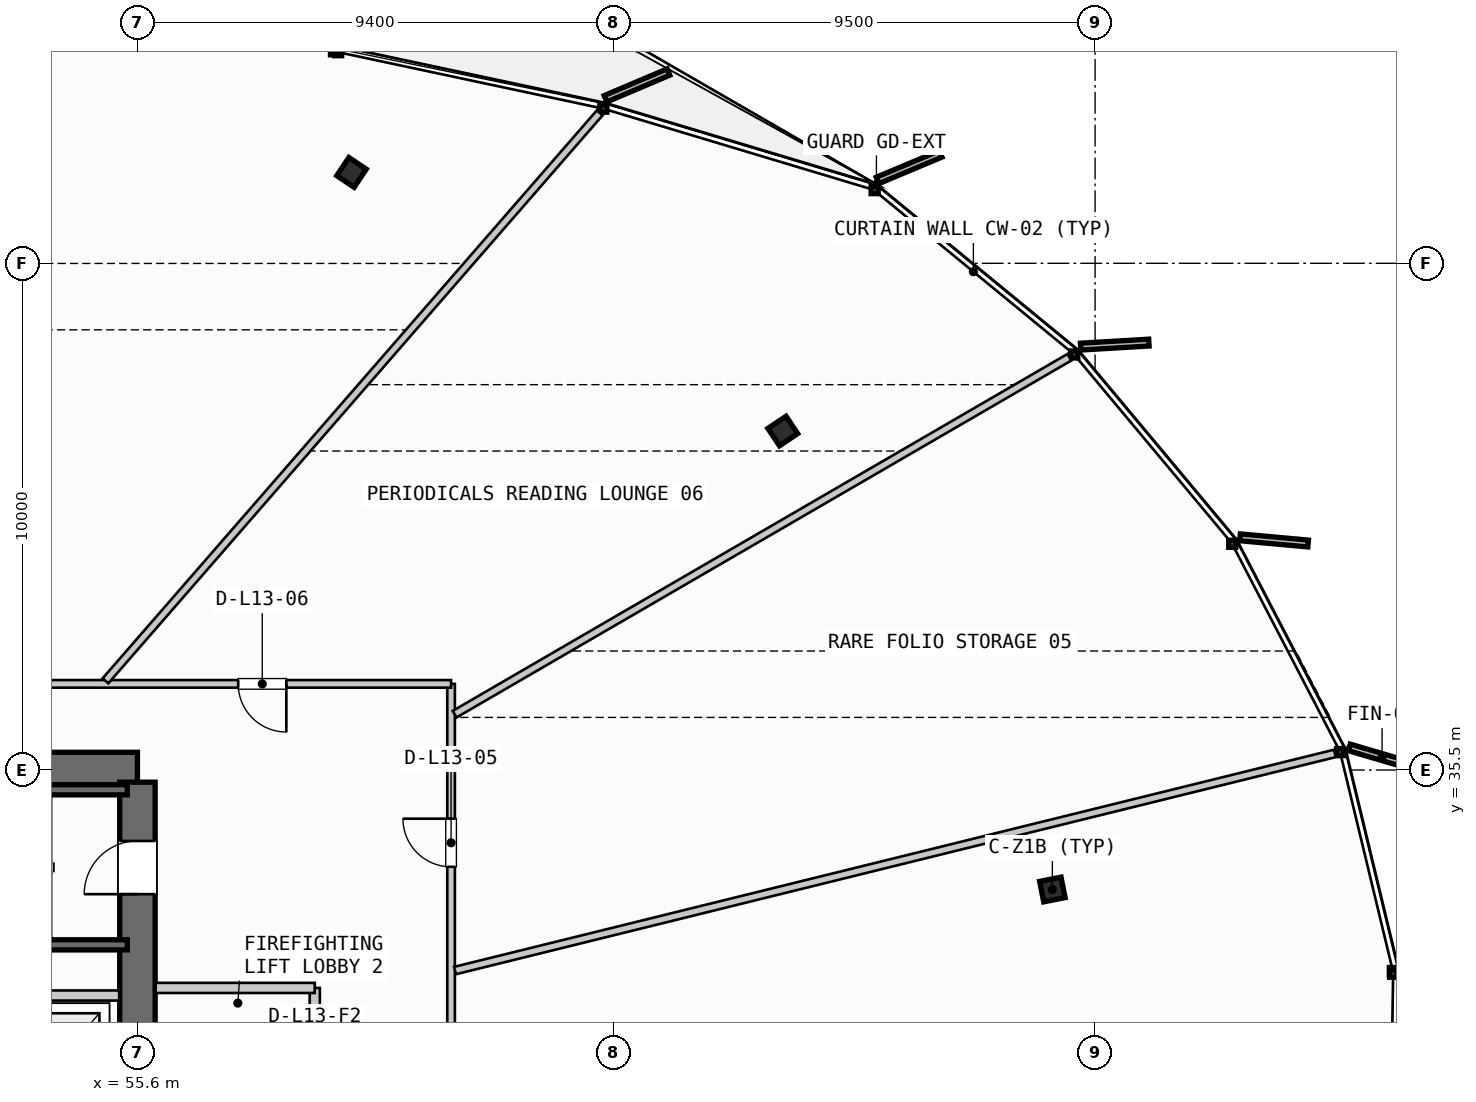
"""IFC4 building model, lengths in metres.
Left out: names, types, materials, properties, quantities, classifications, styles, units other than length and angle.
Written with IfcOpenShell. Run it as: python <this file> out.ifc"""

import sys

from ifc_helpers import new_model, si_unit, direction, frame, frame_2d, origin, origin_2d, place, context, subcontext, project, spatial, rectangle, i_section, extrude, source, transform, mapped, element, fill, save


model = new_model("IFC4")
c1 = context("Model", 3, precision=1e-05, world=origin(), true_north=direction((0.0, 1.0)))
c2 = subcontext(c1, "Body", "Model", "MODEL_VIEW")
j1 = project(units=[si_unit("LENGTHUNIT", "METRE"), si_unit("PLANEANGLEUNIT", "RADIAN")], contexts=[c1])
p1 = place(None, origin())
s1 = spatial("IfcSite", under=j1, at=p1, CompositionType="ELEMENT")
p2 = place(p1, origin())
s2 = spatial("IfcBuilding", under=s1, at=p2, CompositionType="ELEMENT")
p3 = place(p2, frame((0.0, 0.0, 56.2)))
s3 = spatial("IfcBuildingStorey", under=s2, at=p3, CompositionType="ELEMENT", Elevation=56.2)
p4 = place(p3, frame((55.6, 35.5, 0.0), z_axis=(0.0, 0.0, 1.0), x_axis=(-1.0, 0.0, 0.0)))
e1 = element("IfcWall", 1, at=p4, inside=s3, PredefinedType="SHEAR", context=c2, shape_type="SweptSolid", body=[
    extrude(rectangle(XDim=17.6, YDim=0.7, at=frame_2d((8.8, 0.0))), origin(), (0.0, 0.0, 1.0), 3.55),
])
p5 = place(p4, frame((8.05, 0.0, 0.0)))
e2 = element("IfcOpeningElement", 2, at=p5, cuts=e1, PredefinedType="OPENING", context=c2, shape_type="SweptSolid", body=[
    extrude(rectangle(XDim=1.5, YDim=2.2, at=frame_2d((0.75, 1.1))), frame((0.0, 0.36, 0.0), z_axis=(0.0, -1.0, 0.0), x_axis=(1.0, 0.0, 0.0)), (0.0, 0.0, 1.0), 0.72),
])
p6 = place(p4, frame((14.95, 0.0, 0.0)))
e3 = element("IfcOpeningElement", 3, at=p6, cuts=e1, PredefinedType="OPENING", context=c2, shape_type="SweptSolid", body=[
    extrude(rectangle(XDim=1.4, YDim=2.3, at=frame_2d((0.7, 1.15))), frame((0.0, 0.36, 0.0), z_axis=(0.0, -1.0, 0.0), x_axis=(1.0, 0.0, 0.0)), (0.0, 0.0, 1.0), 0.72),
])
p7 = place(p4, frame((12.3, 0.0, 0.0)))
e4 = element("IfcOpeningElement", 4, at=p7, cuts=e1, PredefinedType="OPENING", context=c2, shape_type="SweptSolid", body=[
    extrude(rectangle(XDim=0.95, YDim=2.15, at=frame_2d((0.475, 1.075))), frame((0.0, 0.36, 0.0), z_axis=(0.0, -1.0, 0.0), x_axis=(1.0, 0.0, 0.0)), (0.0, 0.0, 1.0), 0.72),
])
p8 = place(p4, frame((10.2, 0.0, 0.0)))
e5 = element("IfcOpeningElement", 5, at=p8, cuts=e1, PredefinedType="OPENING", context=c2, shape_type="SweptSolid", body=[
    extrude(rectangle(XDim=0.9, YDim=2.15, at=frame_2d((0.45, 1.075))), frame((0.0, 0.36, 0.0), z_axis=(0.0, -1.0, 0.0), x_axis=(1.0, 0.0, 0.0)), (0.0, 0.0, 1.0), 0.72),
])
p9 = place(p3, frame((55.6, 20.34, 0.0), z_axis=(0.0, 0.0, 1.0), x_axis=(0.0, 1.0, 0.0)))
e6 = element("IfcWall", 6, at=p9, inside=s3, PredefinedType="SHEAR", context=c2, shape_type="SweptSolid", body=[
    extrude(rectangle(XDim=14.92, YDim=0.7, at=frame_2d((7.46, 0.0))), origin(), (0.0, 0.0, 1.0), 3.55),
])
p10 = place(p9, frame((12.71, 0.0, 0.0)))
e7 = element("IfcOpeningElement", 7, at=p10, cuts=e6, PredefinedType="OPENING", context=c2, shape_type="SweptSolid", body=[
    extrude(rectangle(XDim=1.05, YDim=2.15, at=frame_2d((0.525, 1.075))), frame((0.0, 0.36, 0.0), z_axis=(0.0, -1.0, 0.0), x_axis=(1.0, 0.0, 0.0)), (0.0, 0.0, 1.0), 0.72),
])
p11 = place(p9, frame((8.61, 0.0, 0.0)))
e8 = element("IfcOpeningElement", 8, at=p11, cuts=e6, PredefinedType="OPENING", context=c2, shape_type="SweptSolid", body=[
    extrude(rectangle(XDim=1.1, YDim=2.2, at=frame_2d((0.55, 1.1))), frame((0.0, 0.36, 0.0), z_axis=(0.0, -1.0, 0.0), x_axis=(1.0, 0.0, 0.0)), (0.0, 0.0, 1.0), 0.72),
])
m1 = source(origin(), c2, "Body", "SweptSolid", [
    extrude(i_section(OverallWidth=0.412, OverallDepth=0.431, WebThickness=0.042, FlangeThickness=0.068, FilletRadius=0.015, at=origin_2d()), origin(), (0.0, 0.0, 1.0), 3.55),
])
for number, where, z_axis, x_axis in (
    (9, (73.657, 33.142, 0.0), (0.0, 0.0, 1.0), (0.981, 0.195, 0.0)),
    (10, (68.336, 42.19, 0.0), (0.0, 0.0, 1.0), (0.831, 0.556, 0.0)),
    (11, (59.825, 47.293, 0.0), (0.0, 0.0, 1.0), (0.556, 0.831, 0.0)),
):
    element("IfcColumn", number, at=place(p3, frame(where, z_axis=z_axis, x_axis=x_axis)), inside=s3, PredefinedType="COLUMN", context=c2, shape_type="MappedRepresentation", body=[
        mapped(m1, transform((0.0, 0.0, 0.0), scale=1.0)),
    ])
for number, where, z_axis, x_axis in (
    (12, (48.05, 35.11, 0.0), (0.0, 0.0, 1.0), (1.0, 0.0, 0.0)),
    (13, (55.4, 32.05, 0.0), (0.0, 0.0, 1.0), (-1.0, 0.0, 0.0)),
):
    element("IfcWall", number, at=place(p3, frame(where, z_axis=z_axis, x_axis=x_axis)), inside=s3, PredefinedType="SHEAR", context=c2, shape_type="SweptSolid", body=[
        extrude(rectangle(XDim=7.35, YDim=0.2, at=frame_2d((3.675, 0.0))), origin(), (0.0, 0.0, 1.0), 3.55),
    ])
p12 = place(p3, frame((52.45, 31.05, 0.0), z_axis=(0.0, 0.0, 1.0), x_axis=(1.0, 0.0, 0.0)))
e14 = element("IfcWall", 14, at=p12, inside=s3, PredefinedType="PARTITIONING", context=c2, shape_type="SweptSolid", body=[
    extrude(rectangle(XDim=2.79, YDim=0.2, at=frame_2d((1.395, 0.0))), origin(), (0.0, 0.0, 1.0), 2.645),
])
p13 = place(p3, frame((59.1, 26.8, 0.0), z_axis=(0.0, 0.0, 1.0), x_axis=(0.0, 1.0, 0.0)))
e15 = element("IfcWall", 15, at=p13, inside=s3, PredefinedType="PARTITIONING", context=c2, shape_type="SweptSolid", body=[
    extrude(rectangle(XDim=4.4, YDim=0.2, at=frame_2d((2.2, 0.0))), origin(), (0.0, 0.0, 1.0), 2.645),
])
p14 = place(p13, frame((1.65, 0.0, 0.0)))
e16 = element("IfcOpeningElement", 16, at=p14, cuts=e15, PredefinedType="OPENING", context=c2, shape_type="SweptSolid", body=[
    extrude(rectangle(XDim=1.05, YDim=2.15, at=frame_2d((0.525, 1.075))), frame((0.0, 0.11, 0.0), z_axis=(0.0, -1.0, 0.0), x_axis=(1.0, 0.0, 0.0)), (0.0, 0.0, 1.0), 0.22),
])
p15 = place(p3, frame((55.96, 31.2, 0.0), z_axis=(0.0, 0.0, 1.0), x_axis=(1.0, 0.0, 0.0)))
e17 = element("IfcWall", 17, at=p15, inside=s3, PredefinedType="PARTITIONING", context=c2, shape_type="SweptSolid", body=[
    extrude(rectangle(XDim=3.14, YDim=0.2, at=frame_2d((1.57, 0.0))), origin(), (0.0, 0.0, 1.0), 2.645),
])
p16 = place(p3, frame((61.79, 17.98, 0.0), z_axis=(0.0, 0.0, 1.0), x_axis=(0.0, 1.0, 0.0)))
e18 = element("IfcWall", 18, at=p16, inside=s3, PredefinedType="PARTITIONING", context=c2, shape_type="SweptSolid", body=[
    extrude(rectangle(XDim=19.22, YDim=0.15, at=frame_2d((9.61, 0.0))), origin(), (0.0, 0.0, 1.0), 2.645),
])
p17 = place(p16, frame((2.332, 0.0, 0.0)))
e19 = element("IfcOpeningElement", 19, at=p17, cuts=e18, PredefinedType="OPENING", context=c2, shape_type="SweptSolid", body=[
    extrude(rectangle(XDim=0.95, YDim=2.15, at=frame_2d((0.475, 1.075))), frame((0.0, 0.085, 0.0), z_axis=(0.0, -1.0, 0.0), x_axis=(1.0, 0.0, 0.0)), (0.0, 0.0, 1.0), 0.17),
])
p18 = place(p16, frame((8.811, 0.0, 0.0)))
e20 = element("IfcOpeningElement", 20, at=p18, cuts=e18, PredefinedType="OPENING", context=c2, shape_type="SweptSolid", body=[
    extrude(rectangle(XDim=0.95, YDim=2.15, at=frame_2d((0.475, 1.075))), frame((0.0, 0.085, 0.0), z_axis=(0.0, -1.0, 0.0), x_axis=(1.0, 0.0, 0.0)), (0.0, 0.0, 1.0), 0.17),
])
p19 = place(p16, frame((15.61, 0.0, 0.0)))
e21 = element("IfcOpeningElement", 21, at=p19, cuts=e18, PredefinedType="OPENING", context=c2, shape_type="SweptSolid", body=[
    extrude(rectangle(XDim=0.95, YDim=2.15, at=frame_2d((0.475, 1.075))), frame((0.0, 0.085, 0.0), z_axis=(0.0, -1.0, 0.0), x_axis=(1.0, 0.0, 0.0)), (0.0, 0.0, 1.0), 0.17),
])
p20 = place(p3, frame((61.79, 37.2, 0.0), z_axis=(0.0, 0.0, 1.0), x_axis=(-1.0, 0.0, 0.0)))
e22 = element("IfcWall", 22, at=p20, inside=s3, PredefinedType="PARTITIONING", context=c2, shape_type="SweptSolid", body=[
    extrude(rectangle(XDim=29.98, YDim=0.15, at=frame_2d((14.99, 0.0))), origin(), (0.0, 0.0, 1.0), 2.645),
])
p21 = place(p20, frame((3.251, 0.0, 0.0)))
e23 = element("IfcOpeningElement", 23, at=p21, cuts=e22, PredefinedType="OPENING", context=c2, shape_type="SweptSolid", body=[
    extrude(rectangle(XDim=0.95, YDim=2.15, at=frame_2d((0.475, 1.075))), frame((0.0, 0.085, 0.0), z_axis=(0.0, -1.0, 0.0), x_axis=(1.0, 0.0, 0.0)), (0.0, 0.0, 1.0), 0.17),
])
p22 = place(p20, frame((11.996, 0.0, 0.0)))
e24 = element("IfcOpeningElement", 24, at=p22, cuts=e22, PredefinedType="OPENING", context=c2, shape_type="SweptSolid", body=[
    extrude(rectangle(XDim=0.95, YDim=2.15, at=frame_2d((0.475, 1.075))), frame((0.0, 0.085, 0.0), z_axis=(0.0, -1.0, 0.0), x_axis=(1.0, 0.0, 0.0)), (0.0, 0.0, 1.0), 0.17),
])
p23 = place(p20, frame((22.188, 0.0, 0.0)))
e25 = element("IfcOpeningElement", 25, at=p23, cuts=e22, PredefinedType="OPENING", context=c2, shape_type="SweptSolid", body=[
    extrude(rectangle(XDim=0.95, YDim=2.15, at=frame_2d((0.475, 1.075))), frame((0.0, 0.085, 0.0), z_axis=(0.0, -1.0, 0.0), x_axis=(1.0, 0.0, 0.0)), (0.0, 0.0, 1.0), 0.17),
])
p24 = place(p3, frame((61.868, 31.543, 0.0), z_axis=(0.0, 0.0, 1.0), x_axis=(0.970877515326, 0.23957639749, 0.0)))
e26 = element("IfcWall", 26, at=p24, inside=s3, PredefinedType="PARTITIONING", context=c2, shape_type="SweptSolid", body=[
    extrude(rectangle(XDim=17.885, YDim=0.15, at=frame_2d((8.943, 0.0))), origin(), (0.0, 0.0, 1.0), 2.645),
])
p25 = place(p3, frame((61.859, 36.602, 0.0), z_axis=(0.0, 0.0, 1.0), x_axis=(0.864825995499, 0.502071705544, 0.0)))
e27 = element("IfcWall", 27, at=p25, inside=s3, PredefinedType="PARTITIONING", context=c2, shape_type="SweptSolid", body=[
    extrude(rectangle(XDim=14.03, YDim=0.15, at=frame_2d((7.015, 0.0))), origin(), (0.0, 0.0, 1.0), 2.645),
])
p26 = place(p3, frame((54.969, 37.26, 0.0), z_axis=(0.0, 0.0, 1.0), x_axis=(0.656478076952, 0.754345103041, 0.0)))
e28 = element("IfcWall", 28, at=p26, inside=s3, PredefinedType="PARTITIONING", context=c2, shape_type="SweptSolid", body=[
    extrude(rectangle(XDim=14.858, YDim=0.15, at=frame_2d((7.429, 0.0))), origin(), (0.0, 0.0, 1.0), 2.645),
])
m2 = source(origin(), c2, "Body", "SweptSolid", [
    extrude(rectangle(XDim=1.05, YDim=2.15, at=frame_2d((0.525, 1.075))), frame((0.0, 0.025, 0.0), z_axis=(0.0, -1.0, 0.0), x_axis=(1.0, 0.0, 0.0)), (0.0, 0.0, 1.0), 0.05),
])
p27 = place(p10, origin())
e29 = element("IfcDoor", 29, at=p27, inside=s3, OperationType="SINGLE_SWING_LEFT", PredefinedType="DOOR", context=c2, shape_type="MappedRepresentation", body=[
    mapped(m2, transform((0.0, 0.0, 0.0), scale=1.0)),
])
fill(e7, e29)
m3 = source(origin(), c2, "Body", "SweptSolid", [
    extrude(rectangle(XDim=0.95, YDim=2.15, at=frame_2d((0.475, 1.075))), frame((0.0, 0.025, 0.0), z_axis=(0.0, -1.0, 0.0), x_axis=(1.0, 0.0, 0.0)), (0.0, 0.0, 1.0), 0.05),
])
p28 = place(p19, origin())
e30 = element("IfcDoor", 30, at=p28, inside=s3, OperationType="SINGLE_SWING_RIGHT", PredefinedType="DOOR", context=c2, shape_type="MappedRepresentation", body=[
    mapped(m3, transform((0.0, 0.0, 0.0), scale=1.0)),
])
fill(e21, e30)
p29 = place(p21, origin())
e31 = element("IfcDoor", 31, at=p29, inside=s3, OperationType="SINGLE_SWING_LEFT", PredefinedType="DOOR", context=c2, shape_type="MappedRepresentation", body=[
    mapped(m3, transform((0.0, 0.0, 0.0), scale=1.0)),
])
fill(e23, e31)
save(model, sys.argv[1])
